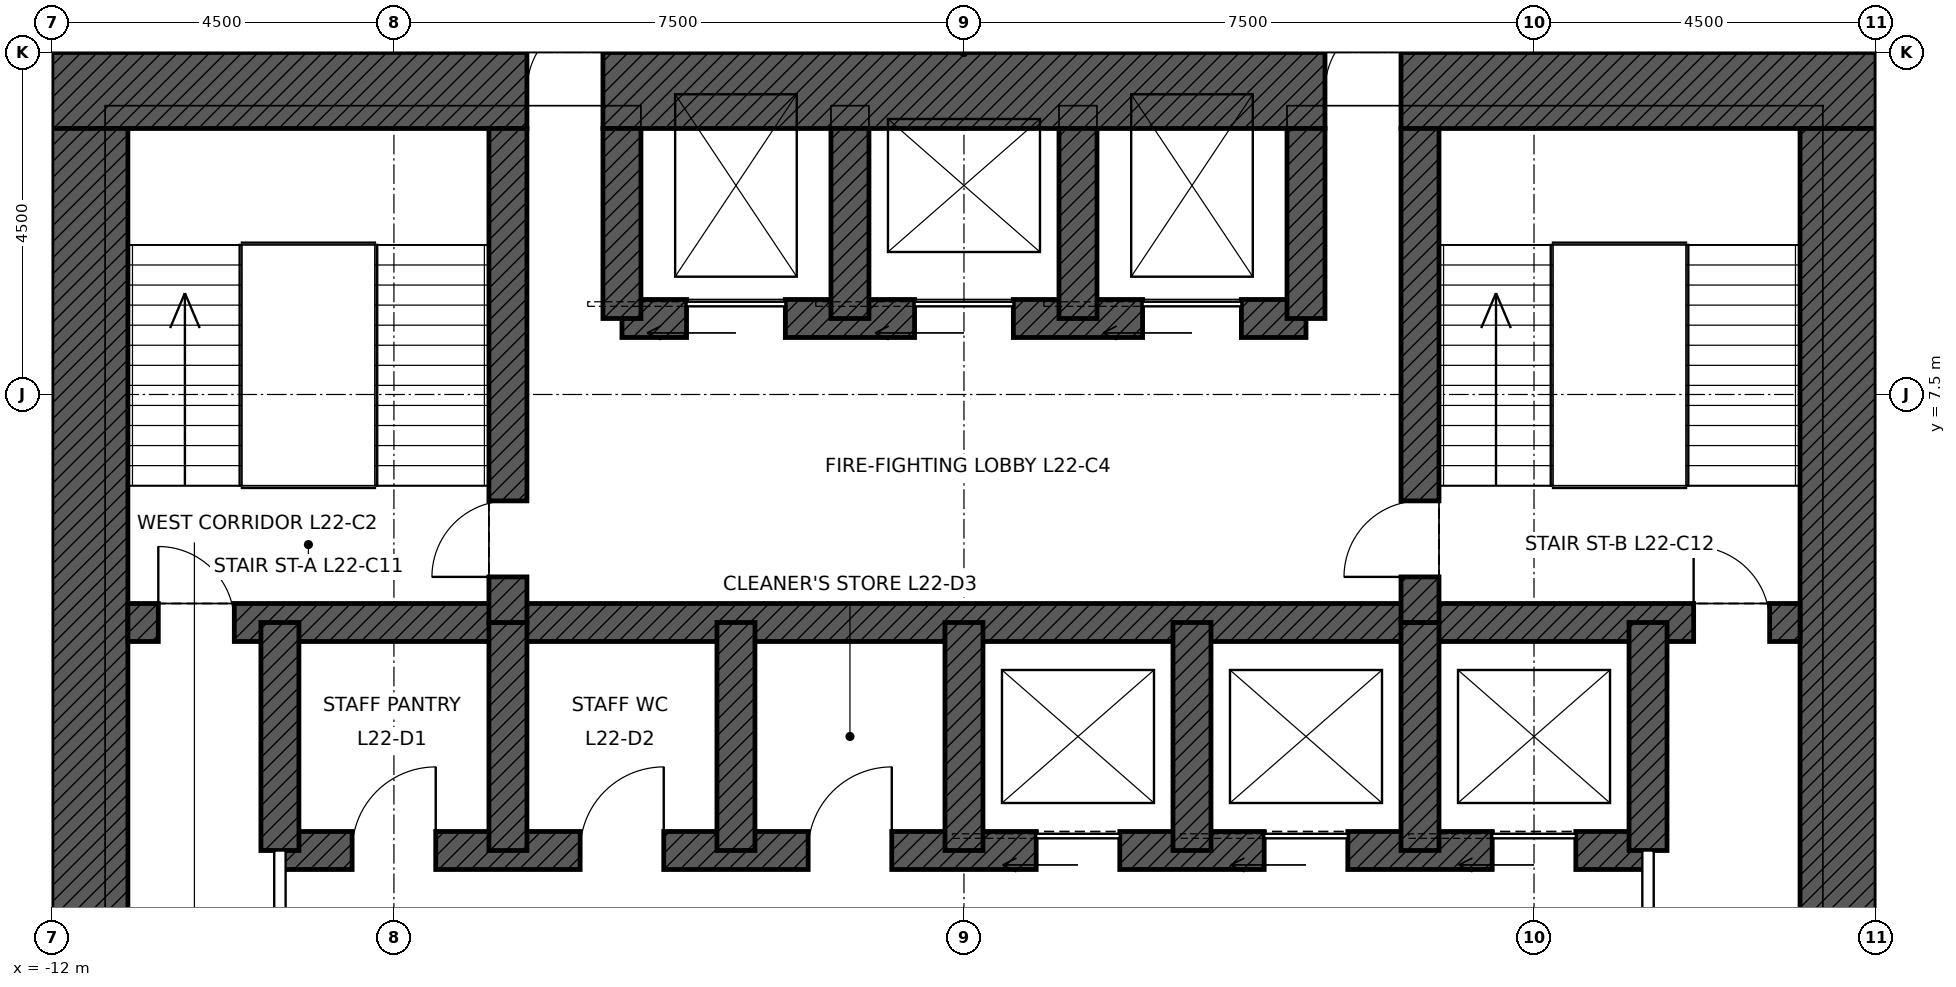
"""IFC4 building model, lengths in metres.
Left out: names, types, materials, properties, quantities, classifications, styles, units other than length and angle.
Written with IfcOpenShell. Run it as: python <this file> out.ifc"""

import sys

from ifc_helpers import new_model, si_unit, direction, frame, frame_2d, origin, place, context, subcontext, project, spatial, rectangle, extrude, element, fill, save


model = new_model("IFC4")
c1 = context("Model", 3, precision=1e-05, world=origin(), true_north=direction((0.0, 1.0)))
c2 = subcontext(c1, "Body", "Model", "MODEL_VIEW")
j1 = project(units=[si_unit("LENGTHUNIT", "METRE"), si_unit("PLANEANGLEUNIT", "RADIAN")], contexts=[c1])
p1 = place(None, origin())
s1 = spatial("IfcSite", under=j1, at=p1, CompositionType="ELEMENT")
p2 = place(p1, origin())
s2 = spatial("IfcBuilding", under=s1, at=p2, CompositionType="ELEMENT")
p3 = place(p2, frame((0.0, 0.0, 113.4)))
s3 = spatial("IfcBuildingStorey", under=s2, at=p3, CompositionType="ELEMENT", Elevation=113.4)
p4 = place(p3, frame((-12.0, 11.5, 0.0), z_axis=(0.0, 0.0, 1.0), x_axis=(1.0, 0.0, 0.0)))
e1 = element("IfcWall", 1, at=p4, inside=s3, PredefinedType="SHEAR", context=c2, shape_type="SweptSolid", body=[
    extrude(rectangle(XDim=24.0, YDim=1.0, at=frame_2d((12.0, 0.0))), origin(), (0.0, 0.0, 1.0), 4.5),
])
p5 = place(p4, frame((6.25, 0.0, 0.0)))
e2 = element("IfcOpeningElement", 2, at=p5, cuts=e1, PredefinedType="OPENING", context=c2, shape_type="SweptSolid", body=[
    extrude(rectangle(XDim=1.0, YDim=2.4, at=frame_2d((0.5, 1.2))), frame((0.0, 0.51, 0.0), z_axis=(0.0, -1.0, 0.0), x_axis=(1.0, 0.0, 0.0)), (0.0, 0.0, 1.0), 1.02),
])
p6 = place(p4, frame((16.75, 0.0, 0.0)))
e3 = element("IfcOpeningElement", 3, at=p6, cuts=e1, PredefinedType="OPENING", context=c2, shape_type="SweptSolid", body=[
    extrude(rectangle(XDim=1.0, YDim=2.4, at=frame_2d((0.5, 1.2))), frame((0.0, 0.51, 0.0), z_axis=(0.0, -1.0, 0.0), x_axis=(1.0, 0.0, 0.0)), (0.0, 0.0, 1.0), 1.02),
])
p7 = place(p3, frame((11.5, 11.0, 0.0), z_axis=(0.0, 0.0, 1.0), x_axis=(0.0, -1.0, 0.0)))
e4 = element("IfcWall", 4, at=p7, inside=s3, PredefinedType="SHEAR", context=c2, shape_type="SweptSolid", body=[
    extrude(rectangle(XDim=22.0, YDim=1.0, at=frame_2d((11.0, 0.0))), origin(), (0.0, 0.0, 1.0), 4.5),
])
p8 = place(p7, frame((10.5, 0.0, 0.0)))
e5 = element("IfcOpeningElement", 5, at=p8, cuts=e4, PredefinedType="OPENING", context=c2, shape_type="SweptSolid", body=[
    extrude(rectangle(XDim=1.0, YDim=2.4, at=frame_2d((0.5, 1.2))), frame((0.0, 0.51, 0.0), z_axis=(0.0, -1.0, 0.0), x_axis=(1.0, 0.0, 0.0)), (0.0, 0.0, 1.0), 1.02),
])
p9 = place(p3, frame((-11.5, -11.0, 0.0), z_axis=(0.0, 0.0, 1.0), x_axis=(0.0, 1.0, 0.0)))
e6 = element("IfcWall", 6, at=p9, inside=s3, PredefinedType="SHEAR", context=c2, shape_type="SweptSolid", body=[
    extrude(rectangle(XDim=22.0, YDim=1.0, at=frame_2d((11.0, 0.0))), origin(), (0.0, 0.0, 1.0), 4.5),
])
p10 = place(p9, frame((10.5, 0.0, 0.0)))
e7 = element("IfcOpeningElement", 7, at=p10, cuts=e6, PredefinedType="OPENING", context=c2, shape_type="SweptSolid", body=[
    extrude(rectangle(XDim=1.0, YDim=2.4, at=frame_2d((0.5, 1.2))), frame((0.0, 0.51, 0.0), z_axis=(0.0, -1.0, 0.0), x_axis=(1.0, 0.0, 0.0)), (0.0, 0.0, 1.0), 1.02),
])
p11 = place(p3, frame((-11.0, 4.5, 0.0), z_axis=(0.0, 0.0, 1.0), x_axis=(1.0, 0.0, 0.0)))
e8 = element("IfcWall", 8, at=p11, inside=s3, PredefinedType="SHEAR", context=c2, shape_type="SweptSolid", body=[
    extrude(rectangle(XDim=22.0, YDim=0.5, at=frame_2d((11.0, 0.0))), origin(), (0.0, 0.0, 1.0), 4.5),
])
p12 = place(p11, frame((0.4, 0.0, 0.0)))
e9 = element("IfcOpeningElement", 9, at=p12, cuts=e8, PredefinedType="OPENING", context=c2, shape_type="SweptSolid", body=[
    extrude(rectangle(XDim=1.0, YDim=2.1, at=frame_2d((0.5, 1.05))), frame((0.0, 0.26, 0.0), z_axis=(0.0, -1.0, 0.0), x_axis=(1.0, 0.0, 0.0)), (0.0, 0.0, 1.0), 0.52),
])
p13 = place(p11, frame((20.6, 0.0, 0.0)))
e10 = element("IfcOpeningElement", 10, at=p13, cuts=e8, PredefinedType="OPENING", context=c2, shape_type="SweptSolid", body=[
    extrude(rectangle(XDim=1.0, YDim=2.1, at=frame_2d((0.5, 1.05))), frame((0.0, 0.26, 0.0), z_axis=(0.0, -1.0, 0.0), x_axis=(1.0, 0.0, 0.0)), (0.0, 0.0, 1.0), 0.52),
])
p14 = place(p3, frame((-9.0, 1.5, 0.0), z_axis=(0.0, 0.0, 1.0), x_axis=(1.0, 0.0, 0.0)))
e11 = element("IfcWall", 11, at=p14, inside=s3, PredefinedType="SHEAR", context=c2, shape_type="SweptSolid", body=[
    extrude(rectangle(XDim=18.0, YDim=0.5, at=frame_2d((9.0, 0.0))), origin(), (0.0, 0.0, 1.0), 4.5),
])
p15 = place(p14, frame((9.95, 0.0, 0.0)))
e12 = element("IfcOpeningElement", 12, at=p15, cuts=e11, PredefinedType="OPENING", context=c2, shape_type="SweptSolid", body=[
    extrude(rectangle(XDim=1.1, YDim=2.1, at=frame_2d((0.55, 1.05))), frame((0.0, 0.26, 0.0), z_axis=(0.0, -1.0, 0.0), x_axis=(1.0, 0.0, 0.0)), (0.0, 0.0, 1.0), 0.52),
])
p16 = place(p14, frame((12.95, 0.0, 0.0)))
e13 = element("IfcOpeningElement", 13, at=p16, cuts=e11, PredefinedType="OPENING", context=c2, shape_type="SweptSolid", body=[
    extrude(rectangle(XDim=1.1, YDim=2.1, at=frame_2d((0.55, 1.05))), frame((0.0, 0.26, 0.0), z_axis=(0.0, -1.0, 0.0), x_axis=(1.0, 0.0, 0.0)), (0.0, 0.0, 1.0), 0.52),
])
p17 = place(p14, frame((15.95, 0.0, 0.0)))
e14 = element("IfcOpeningElement", 14, at=p17, cuts=e11, PredefinedType="OPENING", context=c2, shape_type="SweptSolid", body=[
    extrude(rectangle(XDim=1.1, YDim=2.1, at=frame_2d((0.55, 1.05))), frame((0.0, 0.26, 0.0), z_axis=(0.0, -1.0, 0.0), x_axis=(1.0, 0.0, 0.0)), (0.0, 0.0, 1.0), 0.52),
])
p18 = place(p14, frame((0.95, 0.0, 0.0)))
e15 = element("IfcOpeningElement", 15, at=p18, cuts=e11, PredefinedType="OPENING", context=c2, shape_type="SweptSolid", body=[
    extrude(rectangle(XDim=1.1, YDim=2.1, at=frame_2d((0.55, 1.05))), frame((0.0, 0.26, 0.0), z_axis=(0.0, -1.0, 0.0), x_axis=(1.0, 0.0, 0.0)), (0.0, 0.0, 1.0), 0.52),
])
p19 = place(p14, frame((3.95, 0.0, 0.0)))
e16 = element("IfcOpeningElement", 16, at=p19, cuts=e11, PredefinedType="OPENING", context=c2, shape_type="SweptSolid", body=[
    extrude(rectangle(XDim=1.1, YDim=2.1, at=frame_2d((0.55, 1.05))), frame((0.0, 0.26, 0.0), z_axis=(0.0, -1.0, 0.0), x_axis=(1.0, 0.0, 0.0)), (0.0, 0.0, 1.0), 0.52),
])
p20 = place(p14, frame((6.95, 0.0, 0.0)))
e17 = element("IfcOpeningElement", 17, at=p20, cuts=e11, PredefinedType="OPENING", context=c2, shape_type="SweptSolid", body=[
    extrude(rectangle(XDim=1.1, YDim=2.1, at=frame_2d((0.55, 1.05))), frame((0.0, 0.26, 0.0), z_axis=(0.0, -1.0, 0.0), x_axis=(1.0, 0.0, 0.0)), (0.0, 0.0, 1.0), 0.52),
])
p21 = place(p3, frame((-4.5, 8.5, 0.0), z_axis=(0.0, 0.0, 1.0), x_axis=(1.0, 0.0, 0.0)))
e18 = element("IfcWall", 18, at=p21, inside=s3, PredefinedType="SHEAR", context=c2, shape_type="SweptSolid", body=[
    extrude(rectangle(XDim=9.0, YDim=0.5, at=frame_2d((4.5, 0.0))), origin(), (0.0, 0.0, 1.0), 4.5),
])
p22 = place(p21, frame((0.85, 0.0, 0.0)))
e19 = element("IfcOpeningElement", 19, at=p22, cuts=e18, PredefinedType="OPENING", context=c2, shape_type="SweptSolid", body=[
    extrude(rectangle(XDim=1.3, YDim=2.4, at=frame_2d((0.65, 1.2))), frame((0.0, 0.26, 0.0), z_axis=(0.0, -1.0, 0.0), x_axis=(1.0, 0.0, 0.0)), (0.0, 0.0, 1.0), 0.52),
])
p23 = place(p21, frame((6.85, 0.0, 0.0)))
e20 = element("IfcOpeningElement", 20, at=p23, cuts=e18, PredefinedType="OPENING", context=c2, shape_type="SweptSolid", body=[
    extrude(rectangle(XDim=1.3, YDim=2.4, at=frame_2d((0.65, 1.2))), frame((0.0, 0.26, 0.0), z_axis=(0.0, -1.0, 0.0), x_axis=(1.0, 0.0, 0.0)), (0.0, 0.0, 1.0), 0.52),
])
p24 = place(p21, frame((3.85, 0.0, 0.0)))
e21 = element("IfcOpeningElement", 21, at=p24, cuts=e18, PredefinedType="OPENING", context=c2, shape_type="SweptSolid", body=[
    extrude(rectangle(XDim=1.3, YDim=2.4, at=frame_2d((0.65, 1.2))), frame((0.0, 0.26, 0.0), z_axis=(0.0, -1.0, 0.0), x_axis=(1.0, 0.0, 0.0)), (0.0, 0.0, 1.0), 0.52),
])
for number, where, z_axis, x_axis in (
    (22, (-9.0, 1.5, 0.0), (0.0, 0.0, 1.0), (0.0, 1.0, 0.0)),
    (23, (9.0, 1.5, 0.0), (0.0, 0.0, 1.0), (0.0, 1.0, 0.0)),
    (24, (-6.0, 1.5, 0.0), (0.0, 0.0, 1.0), (0.0, 1.0, 0.0)),
    (25, (-3.0, 1.5, 0.0), (0.0, 0.0, 1.0), (0.0, 1.0, 0.0)),
    (26, (0.0, 1.5, 0.0), (0.0, 0.0, 1.0), (0.0, 1.0, 0.0)),
    (27, (3.0, 1.5, 0.0), (0.0, 0.0, 1.0), (0.0, 1.0, 0.0)),
    (28, (6.0, 1.5, 0.0), (0.0, 0.0, 1.0), (0.0, 1.0, 0.0)),
):
    element("IfcWall", number, at=place(p3, frame(where, z_axis=z_axis, x_axis=x_axis)), inside=s3, PredefinedType="SHEAR", context=c2, shape_type="SweptSolid", body=[
        extrude(rectangle(XDim=3.0, YDim=0.5, at=frame_2d((1.5, 0.0))), origin(), (0.0, 0.0, 1.0), 4.5),
    ])
p25 = place(p3, frame((-6.0, 4.5, 0.0), z_axis=(0.0, 0.0, 1.0), x_axis=(0.0, 1.0, 0.0)))
e29 = element("IfcWall", 29, at=p25, inside=s3, PredefinedType="SHEAR", context=c2, shape_type="SweptSolid", body=[
    extrude(rectangle(XDim=6.5, YDim=0.5, at=frame_2d((3.25, 0.0))), origin(), (0.0, 0.0, 1.0), 4.5),
])
p26 = place(p25, frame((0.6, 0.0, 0.0)))
e30 = element("IfcOpeningElement", 30, at=p26, cuts=e29, PredefinedType="OPENING", context=c2, shape_type="SweptSolid", body=[
    extrude(rectangle(XDim=1.0, YDim=2.1, at=frame_2d((0.5, 1.05))), frame((0.0, 0.26, 0.0), z_axis=(0.0, -1.0, 0.0), x_axis=(1.0, 0.0, 0.0)), (0.0, 0.0, 1.0), 0.52),
])
p27 = place(p3, frame((6.0, 4.5, 0.0), z_axis=(0.0, 0.0, 1.0), x_axis=(0.0, 1.0, 0.0)))
e31 = element("IfcWall", 31, at=p27, inside=s3, PredefinedType="SHEAR", context=c2, shape_type="SweptSolid", body=[
    extrude(rectangle(XDim=6.5, YDim=0.5, at=frame_2d((3.25, 0.0))), origin(), (0.0, 0.0, 1.0), 4.5),
])
p28 = place(p27, frame((0.6, 0.0, 0.0)))
e32 = element("IfcOpeningElement", 32, at=p28, cuts=e31, PredefinedType="OPENING", context=c2, shape_type="SweptSolid", body=[
    extrude(rectangle(XDim=1.0, YDim=2.1, at=frame_2d((0.5, 1.05))), frame((0.0, 0.26, 0.0), z_axis=(0.0, -1.0, 0.0), x_axis=(1.0, 0.0, 0.0)), (0.0, 0.0, 1.0), 0.52),
])
for number, where, z_axis, x_axis in (
    (33, (-4.5, 8.5, 0.0), (0.0, 0.0, 1.0), (0.0, 1.0, 0.0)),
    (34, (4.5, 8.5, 0.0), (0.0, 0.0, 1.0), (0.0, 1.0, 0.0)),
    (35, (-1.5, 8.5, 0.0), (0.0, 0.0, 1.0), (0.0, 1.0, 0.0)),
    (36, (1.5, 8.5, 0.0), (0.0, 0.0, 1.0), (0.0, 1.0, 0.0)),
):
    element("IfcWall", number, at=place(p3, frame(where, z_axis=z_axis, x_axis=x_axis)), inside=s3, PredefinedType="SHEAR", context=c2, shape_type="SweptSolid", body=[
        extrude(rectangle(XDim=2.5, YDim=0.5, at=frame_2d((1.25, 0.0))), origin(), (0.0, 0.0, 1.0), 4.5),
    ])
p29 = place(p3, frame((-9.0, -1.5, 0.0), z_axis=(0.0, 0.0, 1.0), x_axis=(0.0, 1.0, 0.0)))
e37 = element("IfcWall", 37, at=p29, inside=s3, PredefinedType="PARTITIONING", context=c2, shape_type="SweptSolid", body=[
    extrude(rectangle(XDim=3.0, YDim=0.15, at=frame_2d((1.5, 0.0))), origin(), (0.0, 0.0, 1.0), 4.25),
])
p30 = place(p29, frame((1.0, 0.0, 0.0)))
e38 = element("IfcOpeningElement", 38, at=p30, cuts=e37, PredefinedType="OPENING", context=c2, shape_type="SweptSolid", body=[
    extrude(rectangle(XDim=1.0, YDim=2.4, at=frame_2d((0.5, 1.2))), frame((0.0, 0.085, 0.0), z_axis=(0.0, -1.0, 0.0), x_axis=(1.0, 0.0, 0.0)), (0.0, 0.0, 1.0), 0.17),
])
p31 = place(p3, frame((9.0, -1.5, 0.0), z_axis=(0.0, 0.0, 1.0), x_axis=(0.0, 1.0, 0.0)))
e39 = element("IfcWall", 39, at=p31, inside=s3, PredefinedType="PARTITIONING", context=c2, shape_type="SweptSolid", body=[
    extrude(rectangle(XDim=3.0, YDim=0.15, at=frame_2d((1.5, 0.0))), origin(), (0.0, 0.0, 1.0), 4.25),
])
p32 = place(p31, frame((1.0, 0.0, 0.0)))
e40 = element("IfcOpeningElement", 40, at=p32, cuts=e39, PredefinedType="OPENING", context=c2, shape_type="SweptSolid", body=[
    extrude(rectangle(XDim=1.0, YDim=2.4, at=frame_2d((0.5, 1.2))), frame((0.0, 0.085, 0.0), z_axis=(0.0, -1.0, 0.0), x_axis=(1.0, 0.0, 0.0)), (0.0, 0.0, 1.0), 0.17),
])
p33 = place(p12, origin())
e41 = element("IfcDoor", 41, at=p33, inside=s3, OperationType="SINGLE_SWING_LEFT", PredefinedType="DOOR", context=c2, shape_type="SweptSolid", body=[
    extrude(rectangle(XDim=1.0, YDim=2.1, at=frame_2d((0.5, 1.05))), frame((0.0, 0.025, 0.0), z_axis=(0.0, -1.0, 0.0), x_axis=(1.0, 0.0, 0.0)), (0.0, 0.0, 1.0), 0.05),
])
fill(e9, e41)
p34 = place(p13, origin())
e42 = element("IfcDoor", 42, at=p34, inside=s3, OperationType="SINGLE_SWING_LEFT", PredefinedType="DOOR", context=c2, shape_type="SweptSolid", body=[
    extrude(rectangle(XDim=1.0, YDim=2.1, at=frame_2d((0.5, 1.05))), frame((0.0, 0.025, 0.0), z_axis=(0.0, -1.0, 0.0), x_axis=(1.0, 0.0, 0.0)), (0.0, 0.0, 1.0), 0.05),
])
fill(e10, e42)
p35 = place(p26, origin())
e43 = element("IfcDoor", 43, at=p35, inside=s3, OperationType="SINGLE_SWING_LEFT", PredefinedType="DOOR", context=c2, shape_type="SweptSolid", body=[
    extrude(rectangle(XDim=1.0, YDim=2.1, at=frame_2d((0.5, 1.05))), frame((0.0, 0.025, 0.0), z_axis=(0.0, -1.0, 0.0), x_axis=(1.0, 0.0, 0.0)), (0.0, 0.0, 1.0), 0.05),
])
fill(e30, e43)
p36 = place(p28, origin())
e44 = element("IfcDoor", 44, at=p36, inside=s3, OperationType="SINGLE_SWING_LEFT", PredefinedType="DOOR", context=c2, shape_type="SweptSolid", body=[
    extrude(rectangle(XDim=1.0, YDim=2.1, at=frame_2d((0.5, 1.05))), frame((0.0, 0.025, 0.0), z_axis=(0.0, -1.0, 0.0), x_axis=(1.0, 0.0, 0.0)), (0.0, 0.0, 1.0), 0.05),
])
fill(e32, e44)
p37 = place(p5, origin())
e45 = element("IfcDoor", 45, at=p37, inside=s3, OperationType="SINGLE_SWING_RIGHT", PredefinedType="DOOR", context=c2, shape_type="SweptSolid", body=[
    extrude(rectangle(XDim=1.0, YDim=2.4, at=frame_2d((0.5, 1.2))), frame((0.0, 0.485, 0.0), z_axis=(0.0, -1.0, 0.0), x_axis=(1.0, 0.0, 0.0)), (0.0, 0.0, 1.0), 0.05),
])
fill(e2, e45)
p38 = place(p6, origin())
e46 = element("IfcDoor", 46, at=p38, inside=s3, OperationType="SINGLE_SWING_RIGHT", PredefinedType="DOOR", context=c2, shape_type="SweptSolid", body=[
    extrude(rectangle(XDim=1.0, YDim=2.4, at=frame_2d((0.5, 1.2))), frame((0.0, 0.485, 0.0), z_axis=(0.0, -1.0, 0.0), x_axis=(1.0, 0.0, 0.0)), (0.0, 0.0, 1.0), 0.05),
])
fill(e3, e46)
p39 = place(p22, origin())
e47 = element("IfcDoor", 47, at=p39, inside=s3, OperationType="SLIDING_TO_LEFT", PredefinedType="DOOR", context=c2, shape_type="SweptSolid", body=[
    extrude(rectangle(XDim=1.3, YDim=2.4, at=frame_2d((0.65, 1.2))), frame((0.0, 0.025, 0.0), z_axis=(0.0, -1.0, 0.0), x_axis=(1.0, 0.0, 0.0)), (0.0, 0.0, 1.0), 0.05),
])
fill(e19, e47)
p40 = place(p23, origin())
e48 = element("IfcDoor", 48, at=p40, inside=s3, OperationType="SLIDING_TO_LEFT", PredefinedType="DOOR", context=c2, shape_type="SweptSolid", body=[
    extrude(rectangle(XDim=1.3, YDim=2.4, at=frame_2d((0.65, 1.2))), frame((0.0, 0.025, 0.0), z_axis=(0.0, -1.0, 0.0), x_axis=(1.0, 0.0, 0.0)), (0.0, 0.0, 1.0), 0.05),
])
fill(e20, e48)
p41 = place(p24, origin())
e49 = element("IfcDoor", 49, at=p41, inside=s3, OperationType="SLIDING_TO_LEFT", PredefinedType="DOOR", context=c2, shape_type="SweptSolid", body=[
    extrude(rectangle(XDim=1.3, YDim=2.4, at=frame_2d((0.65, 1.2))), frame((0.0, 0.025, 0.0), z_axis=(0.0, -1.0, 0.0), x_axis=(1.0, 0.0, 0.0)), (0.0, 0.0, 1.0), 0.05),
])
fill(e21, e49)
p42 = place(p15, origin())
e50 = element("IfcDoor", 50, at=p42, inside=s3, OperationType="SLIDING_TO_LEFT", PredefinedType="DOOR", context=c2, shape_type="SweptSolid", body=[
    extrude(rectangle(XDim=1.1, YDim=2.1, at=frame_2d((0.55, 1.05))), frame((0.0, 0.025, 0.0), z_axis=(0.0, -1.0, 0.0), x_axis=(1.0, 0.0, 0.0)), (0.0, 0.0, 1.0), 0.05),
])
fill(e12, e50)
p43 = place(p16, origin())
e51 = element("IfcDoor", 51, at=p43, inside=s3, OperationType="SLIDING_TO_LEFT", PredefinedType="DOOR", context=c2, shape_type="SweptSolid", body=[
    extrude(rectangle(XDim=1.1, YDim=2.1, at=frame_2d((0.55, 1.05))), frame((0.0, 0.025, 0.0), z_axis=(0.0, -1.0, 0.0), x_axis=(1.0, 0.0, 0.0)), (0.0, 0.0, 1.0), 0.05),
])
fill(e13, e51)
p44 = place(p17, origin())
e52 = element("IfcDoor", 52, at=p44, inside=s3, OperationType="SLIDING_TO_LEFT", PredefinedType="DOOR", context=c2, shape_type="SweptSolid", body=[
    extrude(rectangle(XDim=1.1, YDim=2.1, at=frame_2d((0.55, 1.05))), frame((0.0, 0.025, 0.0), z_axis=(0.0, -1.0, 0.0), x_axis=(1.0, 0.0, 0.0)), (0.0, 0.0, 1.0), 0.05),
])
fill(e14, e52)
p45 = place(p18, origin())
e53 = element("IfcDoor", 53, at=p45, inside=s3, OperationType="SINGLE_SWING_RIGHT", PredefinedType="DOOR", context=c2, shape_type="SweptSolid", body=[
    extrude(rectangle(XDim=1.1, YDim=2.1, at=frame_2d((0.55, 1.05))), frame((0.0, 0.025, 0.0), z_axis=(0.0, -1.0, 0.0), x_axis=(1.0, 0.0, 0.0)), (0.0, 0.0, 1.0), 0.05),
])
fill(e15, e53)
p46 = place(p19, origin())
e54 = element("IfcDoor", 54, at=p46, inside=s3, OperationType="SINGLE_SWING_RIGHT", PredefinedType="DOOR", context=c2, shape_type="SweptSolid", body=[
    extrude(rectangle(XDim=1.1, YDim=2.1, at=frame_2d((0.55, 1.05))), frame((0.0, 0.025, 0.0), z_axis=(0.0, -1.0, 0.0), x_axis=(1.0, 0.0, 0.0)), (0.0, 0.0, 1.0), 0.05),
])
fill(e16, e54)
p47 = place(p20, origin())
e55 = element("IfcDoor", 55, at=p47, inside=s3, OperationType="SINGLE_SWING_RIGHT", PredefinedType="DOOR", context=c2, shape_type="SweptSolid", body=[
    extrude(rectangle(XDim=1.1, YDim=2.1, at=frame_2d((0.55, 1.05))), frame((0.0, 0.025, 0.0), z_axis=(0.0, -1.0, 0.0), x_axis=(1.0, 0.0, 0.0)), (0.0, 0.0, 1.0), 0.05),
])
fill(e17, e55)
save(model, sys.argv[1])
